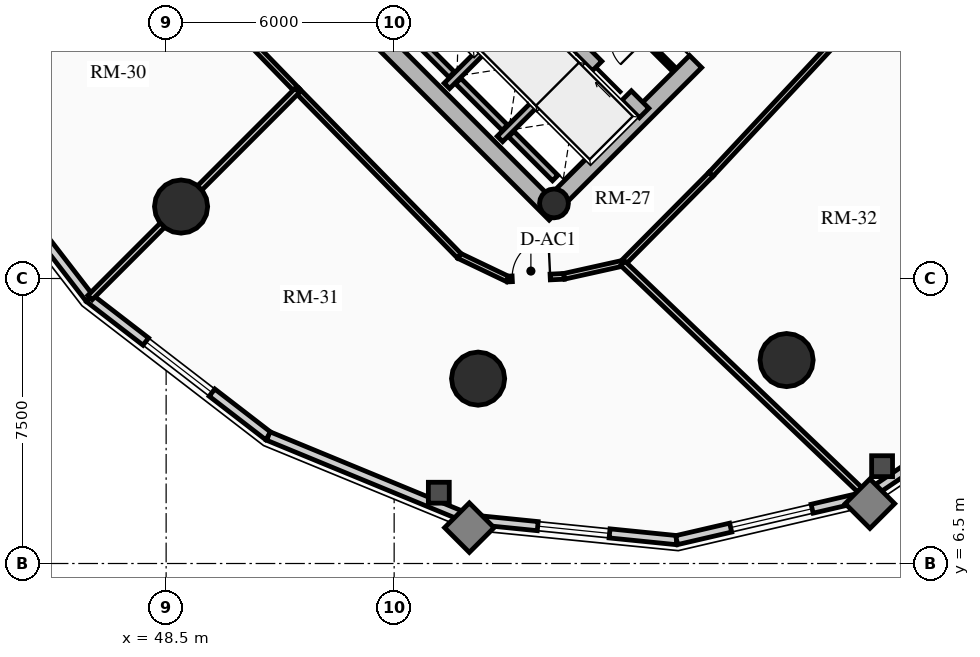
"""IFC4 building model, lengths in metres.
Left out: names, types, materials, properties, quantities, classifications, styles, units other than length and angle.
Written with IfcOpenShell. Run it as: python <this file> out.ifc"""

import sys

from ifc_helpers import new_model, si_unit, direction, frame, frame_2d, origin, origin_2d, place, context, subcontext, project, spatial, rectangle, circle, hollow_circle, extrude, source, transform, mapped, element, fill, save


model = new_model("IFC4")
c1 = context("Model", 3, precision=1e-05, world=origin(), true_north=direction((0.0, 1.0)))
c2 = subcontext(c1, "Body", "Model", "MODEL_VIEW")
j1 = project(units=[si_unit("LENGTHUNIT", "METRE"), si_unit("PLANEANGLEUNIT", "RADIAN")], contexts=[c1])
p1 = place(None, origin())
s1 = spatial("IfcSite", under=j1, at=p1, CompositionType="ELEMENT")
p2 = place(p1, origin())
s2 = spatial("IfcBuilding", under=s1, at=p2, CompositionType="ELEMENT")
p3 = place(p2, frame((0.0, 0.0, 140.32)))
s3 = spatial("IfcBuildingStorey", under=s2, at=p3, CompositionType="ELEMENT", Elevation=140.32)
p4 = place(p3, frame((58.737, 15.697, 0.0), z_axis=(0.0, 0.0, 1.0), x_axis=(-0.707106781187, 0.707106781187, 0.0)))
e1 = element("IfcWall", 1, at=p4, inside=s3, PredefinedType="SHEAR", context=c2, shape_type="SweptSolid", body=[
    extrude(rectangle(XDim=14.2, YDim=0.45, at=frame_2d((7.1, 0.0))), origin(), (0.0, 0.0, 1.0), 3.72),
])
p5 = place(p3, frame((58.578, 15.856, 0.0), z_axis=(0.0, 0.0, 1.0), x_axis=(0.707106781187, 0.707106781187, 0.0)))
e2 = element("IfcWall", 2, at=p5, inside=s3, PredefinedType="SHEAR", context=c2, shape_type="SweptSolid", body=[
    extrude(rectangle(XDim=10.7, YDim=0.45, at=frame_2d((5.35, 0.0))), origin(), (0.0, 0.0, 1.0), 3.72),
])
m1 = source(origin(), c2, "Body", "SweptSolid", [
    extrude(rectangle(XDim=1.5, YDim=2.02, at=frame_2d((0.75, 1.01))), frame((0.0, 0.235, 0.0), z_axis=(0.0, -1.0, 0.0), x_axis=(1.0, 0.0, 0.0)), (0.0, 0.0, 1.0), 0.47),
])
p6 = place(p5, frame((5.45, 0.0, 0.0)))
e3 = element("IfcOpeningElement", 3, at=p6, cuts=e2, PredefinedType="OPENING", context=c2, shape_type="MappedRepresentation", body=[
    mapped(m1, transform((0.0, 0.0, 0.0), x_axis=(1.0, 0.0, 0.0), y_axis=(0.0, 1.0, 0.0), z_axis=(0.0, 0.0, 1.0), scale=1.0)),
])
p7 = place(p3, frame((61.078, 18.355, 0.0), z_axis=(0.0, 0.0, 1.0), x_axis=(-0.707106781187, 0.707106781187, 0.0)))
e4 = element("IfcWall", 4, at=p7, inside=s3, PredefinedType="SHEAR", context=c2, shape_type="SweptSolid", body=[
    extrude(rectangle(XDim=13.75, YDim=0.35, at=frame_2d((6.875, 0.0))), origin(), (0.0, 0.0, 1.0), 3.72),
])
m2 = source(origin(), c2, "Body", "SweptSolid", [
    extrude(rectangle(XDim=1.1, YDim=2.015, at=frame_2d((0.55, 1.007))), frame((0.0, 0.185, 0.0), z_axis=(0.0, -1.0, 0.0), x_axis=(1.0, 0.0, 0.0)), (0.0, 0.0, 1.0), 0.37),
])
p8 = place(p7, frame((4.875, 0.0, 0.0)))
e5 = element("IfcOpeningElement", 5, at=p8, cuts=e4, PredefinedType="OPENING", context=c2, shape_type="MappedRepresentation", body=[
    mapped(m2, transform((0.0, 0.0, 0.0), x_axis=(1.0, 0.0, 0.0), y_axis=(0.0, 1.0, 0.0), z_axis=(0.0, 0.0, 1.0), scale=1.0)),
])
p9 = place(p7, frame((0.65, 0.0, 0.0)))
e6 = element("IfcOpeningElement", 6, at=p9, cuts=e4, PredefinedType="OPENING", context=c2, shape_type="MappedRepresentation", body=[
    mapped(m2, transform((0.0, 0.0, 0.0), x_axis=(1.0, 0.0, 0.0), y_axis=(0.0, 1.0, 0.0), z_axis=(0.0, 0.0, 1.0), scale=1.0)),
])
p10 = place(p7, frame((2.65, 0.0, 0.0)))
e7 = element("IfcOpeningElement", 7, at=p10, cuts=e4, PredefinedType="OPENING", context=c2, shape_type="MappedRepresentation", body=[
    mapped(m2, transform((0.0, 0.0, 0.0), x_axis=(1.0, 0.0, 0.0), y_axis=(0.0, 1.0, 0.0), z_axis=(0.0, 0.0, 1.0), scale=1.0)),
])
m3 = source(origin(), c2, "Body", "SweptSolid", [
    extrude(rectangle(XDim=1.15, YDim=2.02, at=frame_2d((0.575, 1.01))), frame((0.0, 0.185, 0.0), z_axis=(0.0, -1.0, 0.0), x_axis=(1.0, 0.0, 0.0)), (0.0, 0.0, 1.0), 0.37),
])
p11 = place(p7, frame((7.295, 0.0, 0.0)))
e8 = element("IfcOpeningElement", 8, at=p11, cuts=e4, PredefinedType="OPENING", context=c2, shape_type="MappedRepresentation", body=[
    mapped(m3, transform((0.0, 0.0, 0.0), x_axis=(1.0, 0.0, 0.0), y_axis=(0.0, 1.0, 0.0), z_axis=(0.0, 0.0, 1.0), scale=1.0)),
])
p12 = place(p3, frame((58.706, 15.976, 0.0), z_axis=(0.0, 0.0, 1.0), x_axis=(0.707106781187, 0.707106781187, 0.0)))
e9 = element("IfcColumn", 9, at=p12, inside=s3, PredefinedType="COLUMN", context=c2, shape_type="SweptSolid", body=[
    extrude(hollow_circle(Radius=0.38, WallThickness=0.032, at=origin_2d()), origin(), (0.0, 0.0, 1.0), 3.72),
])
for number, where, z_axis, x_axis in (
    (10, (48.893, 15.893, 0.0), (0.0, 0.0, 1.0), (1.0, 0.0, 0.0)),
    (11, (56.709, 11.365, 0.0), (0.0, 0.0, 1.0), (1.0, 0.0, 0.0)),
    (12, (64.827, 11.854, 0.0), (0.0, 0.0, 1.0), (1.0, 0.0, 0.0)),
):
    element("IfcColumn", number, at=place(p3, frame(where, z_axis=z_axis, x_axis=x_axis)), inside=s3, PredefinedType="USERDEFINED", context=c2, shape_type="SweptSolid", body=[
        extrude(circle(Radius=0.7, at=origin_2d()), origin(), (0.0, 0.0, 1.0), 3.72),
    ])
p13 = place(p3, frame((46.483, 13.483, 0.0), z_axis=(0.0, 0.0, 1.0), x_axis=(-0.61054437102, 0.791982052206, 0.0)))
e13 = element("IfcWall", 13, at=p13, inside=s3, PredefinedType="SOLIDWALL", context=c2, shape_type="SweptSolid", body=[
    extrude(rectangle(XDim=5.942, YDim=0.24, at=frame_2d((2.971, 0.0))), origin(), (0.0, 0.0, 1.0), 3.465),
])
p14 = place(p3, frame((51.189, 9.855, 0.0), z_axis=(0.0, 0.0, 1.0), x_axis=(-0.791982052206, 0.61054437102, 0.0)))
e14 = element("IfcWall", 14, at=p14, inside=s3, PredefinedType="SOLIDWALL", context=c2, shape_type="SweptSolid", body=[
    extrude(rectangle(XDim=5.942, YDim=0.24, at=frame_2d((2.971, 0.0))), origin(), (0.0, 0.0, 1.0), 3.465),
])
m4 = source(origin(), c2, "Body", "SweptSolid", [
    extrude(rectangle(XDim=2.2, YDim=1.35, at=frame_2d((1.1, 0.675))), frame((0.0, 0.13, 0.0), z_axis=(0.0, -1.0, 0.0), x_axis=(1.0, 0.0, 0.0)), (0.0, 0.0, 1.0), 0.26),
])
p15 = place(p14, frame((1.871, 0.0, 0.65)))
e15 = element("IfcOpeningElement", 15, at=p15, cuts=e14, PredefinedType="OPENING", context=c2, shape_type="MappedRepresentation", body=[
    mapped(m4, transform((0.0, 0.0, 0.0), x_axis=(1.0, 0.0, 0.0), y_axis=(0.0, 1.0, 0.0), z_axis=(0.0, 0.0, 1.0), scale=1.0)),
])
p16 = place(p3, frame((56.513, 7.661, 0.0), z_axis=(0.0, 0.0, 1.0), x_axis=(-0.924563909604, 0.381027003055, 0.0)))
e16 = element("IfcWall", 16, at=p16, inside=s3, PredefinedType="SOLIDWALL", context=c2, shape_type="SweptSolid", body=[
    extrude(rectangle(XDim=5.758, YDim=0.24, at=frame_2d((2.879, 0.0))), origin(), (0.0, 0.0, 1.0), 3.465),
])
p17 = place(p3, frame((61.933, 7.115, 0.0), z_axis=(0.0, 0.0, 1.0), x_axis=(-0.994971754311, 0.10015591906, 0.0)))
e17 = element("IfcWall", 17, at=p17, inside=s3, PredefinedType="SOLIDWALL", context=c2, shape_type="SweptSolid", body=[
    extrude(rectangle(XDim=5.448, YDim=0.24, at=frame_2d((2.724, 0.0))), origin(), (0.0, 0.0, 1.0), 3.465),
])
m5 = source(origin(), c2, "Body", "SweptSolid", [
    extrude(rectangle(XDim=1.9, YDim=1.35, at=frame_2d((0.95, 0.675))), frame((0.0, 0.13, 0.0), z_axis=(0.0, -1.0, 0.0), x_axis=(1.0, 0.0, 0.0)), (0.0, 0.0, 1.0), 0.26),
])
p18 = place(p17, frame((1.774, 0.0, 0.65)))
e18 = element("IfcOpeningElement", 18, at=p18, cuts=e17, PredefinedType="OPENING", context=c2, shape_type="MappedRepresentation", body=[
    mapped(m5, transform((0.0, 0.0, 0.0), x_axis=(1.0, 0.0, 0.0), y_axis=(0.0, 1.0, 0.0), z_axis=(0.0, 0.0, 1.0), scale=1.0)),
])
p19 = place(p3, frame((66.92, 8.271, 0.0), z_axis=(0.0, 0.0, 1.0), x_axis=(-0.974165631126, -0.225834725257, 0.0)))
e19 = element("IfcWall", 19, at=p19, inside=s3, PredefinedType="SOLIDWALL", context=c2, shape_type="SweptSolid", body=[
    extrude(rectangle(XDim=5.119, YDim=0.24, at=frame_2d((2.56, 0.0))), origin(), (0.0, 0.0, 1.0), 3.465),
])
p20 = place(p19, frame((1.459, 0.0, 0.65)))
e20 = element("IfcOpeningElement", 20, at=p20, cuts=e19, PredefinedType="OPENING", context=c2, shape_type="MappedRepresentation", body=[
    mapped(m4, transform((0.0, 0.0, 0.0), x_axis=(1.0, 0.0, 0.0), y_axis=(0.0, 1.0, 0.0), z_axis=(0.0, 0.0, 1.0), scale=1.0)),
])
p21 = place(p3, frame((70.985, 11.015, 0.0), z_axis=(0.0, 0.0, 1.0), x_axis=(-0.828781148131, -0.559572880421, 0.0)))
e21 = element("IfcWall", 21, at=p21, inside=s3, PredefinedType="SOLIDWALL", context=c2, shape_type="SweptSolid", body=[
    extrude(rectangle(XDim=4.905, YDim=0.24, at=frame_2d((2.452, 0.0))), origin(), (0.0, 0.0, 1.0), 3.465),
])
p22 = place(p3, frame((55.888, 19.069, 0.0), z_axis=(0.0, 0.0, 1.0), x_axis=(0.707106781187, 0.707106781187, 0.0)))
e22 = element("IfcWall", 22, at=p22, inside=s3, PredefinedType="SHEAR", context=c2, shape_type="SweptSolid", body=[
    extrude(rectangle(XDim=2.97, YDim=0.2, at=frame_2d((1.485, 0.0))), origin(), (0.0, 0.0, 1.0), 3.72),
])
p23 = place(p3, frame((56.015, 19.366, 0.0), z_axis=(0.0, 0.0, 1.0), x_axis=(-0.707106781187, 0.707106781187, 0.0)))
e23 = element("IfcWall", 23, at=p23, inside=s3, PredefinedType="SHEAR", context=c2, shape_type="SweptSolid", body=[
    extrude(rectangle(XDim=2.44, YDim=0.2, at=frame_2d((1.22, 0.0))), origin(), (0.0, 0.0, 1.0), 3.72),
])
p24 = place(p3, frame((57.284, 17.673, 0.0), z_axis=(0.0, 0.0, 1.0), x_axis=(0.707147878904, 0.70706568108, 0.0)))
e24 = element("IfcWall", 24, at=p24, inside=s3, PredefinedType="SHEAR", context=c2, shape_type="SweptSolid", body=[
    extrude(rectangle(XDim=2.97, YDim=0.2, at=frame_2d((1.485, 0.0))), origin(), (0.0, 0.0, 1.0), 3.72),
])
p25 = place(p3, frame((57.412, 17.97, 0.0), z_axis=(0.0, 0.0, 1.0), x_axis=(-0.707106781187, 0.707106781187, 0.0)))
e25 = element("IfcWall", 25, at=p25, inside=s3, PredefinedType="SHEAR", context=c2, shape_type="SweptSolid", body=[
    extrude(rectangle(XDim=1.735, YDim=0.2, at=frame_2d((0.867, 0.0))), origin(), (0.0, 0.0, 1.0), 3.72),
])
p26 = place(p3, frame((58.737, 16.644, 0.0), z_axis=(0.0, 0.0, 1.0), x_axis=(-0.707032117043, 0.707181437447, 0.0)))
e26 = element("IfcWall", 26, at=p26, inside=s3, PredefinedType="SHEAR", context=c2, shape_type="SweptSolid", body=[
    extrude(rectangle(XDim=1.635, YDim=0.2, at=frame_2d((0.817, 0.0))), origin(), (0.0, 0.0, 1.0), 3.72),
])
p27 = place(p3, frame((61.835, 19.529, 0.0), z_axis=(0.0, 0.0, 1.0), x_axis=(-0.707146413884, 0.707067146267, 0.0)))
e27 = element("IfcWall", 27, at=p27, inside=s3, PredefinedType="PARTITIONING", context=c2, shape_type="SweptSolid", body=[
    extrude(rectangle(XDim=3.08, YDim=0.125, at=frame_2d((1.54, 0.0))), origin(), (0.0, 0.0, 1.0), 3.465),
])
m6 = source(origin(), c2, "Body", "SweptSolid", [
    extrude(rectangle(XDim=0.9, YDim=2.005, at=frame_2d((0.45, 1.002))), frame((0.0, 0.073, 0.0), z_axis=(0.0, -1.0, 0.0), x_axis=(1.0, 0.0, 0.0)), (0.0, 0.0, 1.0), 0.145),
])
p28 = place(p27, frame((1.05, 0.0, 0.0)))
e28 = element("IfcOpeningElement", 28, at=p28, cuts=e27, PredefinedType="OPENING", context=c2, shape_type="MappedRepresentation", body=[
    mapped(m6, transform((0.0, 0.0, 0.0), x_axis=(1.0, 0.0, 0.0), y_axis=(0.0, 1.0, 0.0), z_axis=(0.0, 0.0, 1.0), scale=1.0)),
])
p29 = place(p3, frame((47.786, 23.242, 0.0), z_axis=(0.0, 0.0, 1.0), x_axis=(0.696183456981, -0.717863910659, 0.0)))
e29 = element("IfcWall", 29, at=p29, inside=s3, PredefinedType="PARTITIONING", context=c2, shape_type="SweptSolid", body=[
    extrude(rectangle(XDim=5.979, YDim=0.15, at=frame_2d((2.99, 0.0))), origin(), (0.0, 0.0, 1.0), 3.465),
])
p30 = place(p3, frame((51.949, 18.949, 0.0), z_axis=(0.0, 0.0, 1.0), x_axis=(0.699801520154, -0.714337337951, 0.0)))
e30 = element("IfcWall", 30, at=p30, inside=s3, PredefinedType="PARTITIONING", context=c2, shape_type="SweptSolid", body=[
    extrude(rectangle(XDim=6.097, YDim=0.15, at=frame_2d((3.048, 0.0))), origin(), (0.0, 0.0, 1.0), 3.035),
])
p31 = place(p3, frame((56.216, 14.594, 0.0), z_axis=(0.0, 0.0, 1.0), x_axis=(0.902219207281, -0.431277755064, 0.0)))
e31 = element("IfcWall", 31, at=p31, inside=s3, PredefinedType="PARTITIONING", context=c2, shape_type="SweptSolid", body=[
    extrude(rectangle(XDim=1.41, YDim=0.15, at=frame_2d((0.705, 0.0))), origin(), (0.0, 0.0, 1.0), 3.035),
])
p32 = place(p3, frame((57.488, 13.986, 0.0), z_axis=(0.0, 0.0, 1.0), x_axis=(0.998863298217, 0.047666670476, 0.0)))
e32 = element("IfcWall", 32, at=p32, inside=s3, PredefinedType="PARTITIONING", context=c2, shape_type="SweptSolid", body=[
    extrude(rectangle(XDim=1.485, YDim=0.15, at=frame_2d((0.743, 0.0))), origin(), (0.0, 0.0, 1.0), 3.035),
])
m7 = source(origin(), c2, "Body", "SweptSolid", [
    extrude(rectangle(XDim=1.0, YDim=2.015, at=frame_2d((0.5, 1.007))), frame((0.0, 0.085, 0.0), z_axis=(0.0, -1.0, 0.0), x_axis=(1.0, 0.0, 0.0)), (0.0, 0.0, 1.0), 0.17),
])
p33 = place(p32, frame((0.12, 0.0, 0.0)))
e33 = element("IfcOpeningElement", 33, at=p33, cuts=e32, PredefinedType="OPENING", context=c2, shape_type="MappedRepresentation", body=[
    mapped(m7, transform((0.0, 0.0, 0.0), x_axis=(1.0, 0.0, 0.0), y_axis=(0.0, 1.0, 0.0), z_axis=(0.0, 0.0, 1.0), scale=1.0)),
])
p34 = place(p3, frame((58.971, 14.057, 0.0), z_axis=(0.0, 0.0, 1.0), x_axis=(0.976085233804, 0.217388169756, 0.0)))
e34 = element("IfcWall", 34, at=p34, inside=s3, PredefinedType="PARTITIONING", context=c2, shape_type="SweptSolid", body=[
    extrude(rectangle(XDim=1.581, YDim=0.15, at=frame_2d((0.791, 0.0))), origin(), (0.0, 0.0, 1.0), 3.035),
])
p35 = place(p3, frame((60.515, 14.401, 0.0), z_axis=(0.0, 0.0, 1.0), x_axis=(0.704179607439, 0.710021887316, 0.0)))
e35 = element("IfcWall", 35, at=p35, inside=s3, PredefinedType="PARTITIONING", context=c2, shape_type="SweptSolid", body=[
    extrude(rectangle(XDim=3.301, YDim=0.15, at=frame_2d((1.651, 0.0))), origin(), (0.0, 0.0, 1.0), 3.035),
])
p36 = place(p3, frame((62.839, 16.745, 0.0), z_axis=(0.0, 0.0, 1.0), x_axis=(0.682386779427, 0.73099130177, 0.0)))
e36 = element("IfcWall", 36, at=p36, inside=s3, PredefinedType="PARTITIONING", context=c2, shape_type="SweptSolid", body=[
    extrude(rectangle(XDim=6.6, YDim=0.15, at=frame_2d((3.3, 0.0))), origin(), (0.0, 0.0, 1.0), 3.035),
])
p37 = place(p3, frame((51.949, 18.949, 0.0), z_axis=(0.0, 0.0, 1.0), x_axis=(-0.707106781187, -0.707106781187, 0.0)))
e37 = element("IfcWall", 37, at=p37, inside=s3, PredefinedType="PARTITIONING", context=c2, shape_type="SweptSolid", body=[
    extrude(rectangle(XDim=7.711, YDim=0.16, at=frame_2d((3.855, 0.0))), origin(), (0.0, 0.0, 1.0), 2.542),
])
p38 = place(p3, frame((60.515, 14.401, 0.0), z_axis=(0.0, 0.0, 1.0), x_axis=(0.722998961483, -0.690849116446, 0.0)))
e38 = element("IfcWall", 38, at=p38, inside=s3, PredefinedType="PARTITIONING", context=c2, shape_type="SweptSolid", body=[
    extrude(rectangle(XDim=8.847, YDim=0.16, at=frame_2d((4.423, 0.0))), origin(), (0.0, 0.0, 1.0), 2.989),
])
m8 = source(origin(), c2, "Body", "SweptSolid", [
    extrude(rectangle(XDim=2.2, YDim=1.35, at=frame_2d((1.1, 0.675))), frame((0.0, 0.03, 0.0), z_axis=(0.0, -1.0, 0.0), x_axis=(1.0, 0.0, 0.0)), (0.0, 0.0, 1.0), 0.06),
])
p39 = place(p15, origin())
e39 = element("IfcWindow", 39, at=p39, inside=s3, PartitioningType="DOUBLE_PANEL_VERTICAL", PredefinedType="WINDOW", context=c2, shape_type="MappedRepresentation", body=[
    mapped(m8, transform((0.0, 0.0, 0.0), x_axis=(1.0, 0.0, 0.0), y_axis=(0.0, 1.0, 0.0), z_axis=(0.0, 0.0, 1.0), scale=1.0)),
])
fill(e15, e39)
m9 = source(origin(), c2, "Body", "SweptSolid", [
    extrude(rectangle(XDim=1.9, YDim=1.35, at=frame_2d((0.95, 0.675))), frame((0.0, 0.03, 0.0), z_axis=(0.0, -1.0, 0.0), x_axis=(1.0, 0.0, 0.0)), (0.0, 0.0, 1.0), 0.06),
])
p40 = place(p18, origin())
e40 = element("IfcWindow", 40, at=p40, inside=s3, PartitioningType="DOUBLE_PANEL_VERTICAL", PredefinedType="WINDOW", context=c2, shape_type="MappedRepresentation", body=[
    mapped(m9, transform((0.0, 0.0, 0.0), x_axis=(1.0, 0.0, 0.0), y_axis=(0.0, 1.0, 0.0), z_axis=(0.0, 0.0, 1.0), scale=1.0)),
])
fill(e18, e40)
p41 = place(p20, origin())
e41 = element("IfcWindow", 41, at=p41, inside=s3, PartitioningType="DOUBLE_PANEL_VERTICAL", PredefinedType="WINDOW", context=c2, shape_type="MappedRepresentation", body=[
    mapped(m8, transform((0.0, 0.0, 0.0), x_axis=(1.0, 0.0, 0.0), y_axis=(0.0, 1.0, 0.0), z_axis=(0.0, 0.0, 1.0), scale=1.0)),
])
fill(e20, e41)
m10 = source(origin(), c2, "Body", "SweptSolid", [
    extrude(rectangle(XDim=1.1, YDim=2.015, at=frame_2d((0.55, 1.007))), frame((0.0, 0.025, 0.0), z_axis=(0.0, -1.0, 0.0), x_axis=(1.0, 0.0, 0.0)), (0.0, 0.0, 1.0), 0.05),
])
p42 = place(p9, origin())
e42 = element("IfcDoor", 42, at=p42, inside=s3, OperationType="SLIDING_TO_RIGHT", PredefinedType="DOOR", context=c2, shape_type="MappedRepresentation", body=[
    mapped(m10, transform((0.0, 0.0, 0.0), x_axis=(1.0, 0.0, 0.0), y_axis=(0.0, 1.0, 0.0), z_axis=(0.0, 0.0, 1.0), scale=1.0)),
])
fill(e6, e42)
m11 = source(origin(), c2, "Body", "SweptSolid", [
    extrude(rectangle(XDim=1.5, YDim=2.02, at=frame_2d((0.75, 1.01))), frame((0.0, 0.025, 0.0), z_axis=(0.0, -1.0, 0.0), x_axis=(1.0, 0.0, 0.0)), (0.0, 0.0, 1.0), 0.05),
])
p43 = place(p6, origin())
e43 = element("IfcDoor", 43, at=p43, inside=s3, OperationType="DOUBLE_DOOR_SINGLE_SWING", PredefinedType="DOOR", context=c2, shape_type="MappedRepresentation", body=[
    mapped(m11, transform((0.0, 0.0, 0.0), x_axis=(1.0, 0.0, 0.0), y_axis=(0.0, 1.0, 0.0), z_axis=(0.0, 0.0, 1.0), scale=1.0)),
])
fill(e3, e43)
m12 = source(origin(), c2, "Body", "SweptSolid", [
    extrude(rectangle(XDim=1.0, YDim=2.015, at=frame_2d((0.5, 1.007))), frame((0.0, 0.025, 0.0), z_axis=(0.0, -1.0, 0.0), x_axis=(1.0, 0.0, 0.0)), (0.0, 0.0, 1.0), 0.05),
])
p44 = place(p33, origin())
e44 = element("IfcDoor", 44, at=p44, inside=s3, OperationType="SINGLE_SWING_RIGHT", PredefinedType="DOOR", context=c2, shape_type="MappedRepresentation", body=[
    mapped(m12, transform((0.0, 0.0, 0.0), x_axis=(1.0, 0.0, 0.0), y_axis=(0.0, 1.0, 0.0), z_axis=(0.0, 0.0, 1.0), scale=1.0)),
])
fill(e33, e44)
save(model, sys.argv[1])
